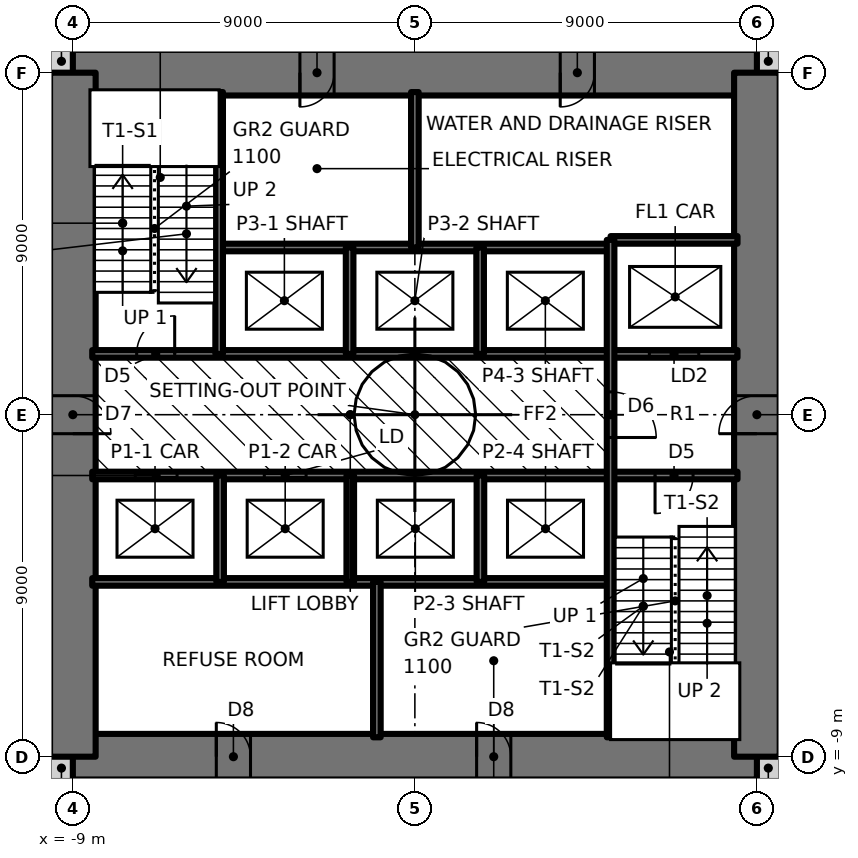
"""IFC4 building model, lengths in metres.
Left out: names, types, materials, properties, quantities, classifications, styles, units other than length and angle.
Written with IfcOpenShell. Run it as: python <this file> out.ifc"""

import sys

from ifc_helpers import new_model, si_unit, direction, frame, frame_2d, origin, place, context, subcontext, project, spatial, rectangle, extrude, element, fill, save


model = new_model("IFC4")
c1 = context("Model", 3, precision=1e-05, world=origin(), true_north=direction((0.0, 1.0)))
c2 = subcontext(c1, "Body", "Model", "MODEL_VIEW")
j1 = project(units=[si_unit("LENGTHUNIT", "METRE"), si_unit("PLANEANGLEUNIT", "RADIAN")], contexts=[c1])
p1 = place(None, origin())
s1 = spatial("IfcSite", under=j1, at=p1, CompositionType="ELEMENT")
p2 = place(p1, origin())
s2 = spatial("IfcBuilding", under=s1, at=p2, CompositionType="ELEMENT")
p3 = place(p2, frame((0.0, 0.0, 10.5)))
s3 = spatial("IfcBuildingStorey", under=s2, at=p3, CompositionType="ELEMENT", Elevation=10.5)
for number, where, z_axis, x_axis in (
    (1, (-9.6, -9.3, 0.0), (0.0, 0.0, 1.0), (1.0, 0.0, 0.0)),
    (2, (9.0, -9.3, 0.0), (0.0, 0.0, 1.0), (1.0, 0.0, 0.0)),
    (3, (9.0, 9.3, 0.0), (0.0, 0.0, 1.0), (1.0, 0.0, 0.0)),
    (4, (-9.6, 9.3, 0.0), (0.0, 0.0, 1.0), (1.0, 0.0, 0.0)),
):
    element("IfcWall", number, at=place(p3, frame(where, z_axis=z_axis, x_axis=x_axis)), inside=s3, PredefinedType="SOLIDWALL", context=c2, shape_type="SweptSolid", body=[
        extrude(rectangle(XDim=0.6, YDim=0.6, at=frame_2d((0.3, 0.0))), origin(), (0.0, 0.0, 1.0), 4.5),
    ])
p4 = place(p3, frame((-9.0, -9.0, 0.0), z_axis=(0.0, 0.0, 1.0), x_axis=(1.0, 0.0, 0.0)))
e5 = element("IfcWall", 5, at=p4, inside=s3, PredefinedType="SHEAR", context=c2, shape_type="SweptSolid", body=[
    extrude(rectangle(XDim=18.0, YDim=1.2, at=frame_2d((9.0, 0.0))), origin(), (0.0, 0.0, 1.0), 4.5),
])
p5 = place(p4, frame((3.775, 0.0, 0.0)))
e6 = element("IfcOpeningElement", 6, at=p5, cuts=e5, PredefinedType="OPENING", context=c2, shape_type="SweptSolid", body=[
    extrude(rectangle(XDim=0.9, YDim=2.1, at=frame_2d((0.45, 1.05))), frame((0.0, 0.61, 0.0), z_axis=(0.0, -1.0, 0.0), x_axis=(1.0, 0.0, 0.0)), (0.0, 0.0, 1.0), 1.22),
])
p6 = place(p4, frame((10.625, 0.0, 0.0)))
e7 = element("IfcOpeningElement", 7, at=p6, cuts=e5, PredefinedType="OPENING", context=c2, shape_type="SweptSolid", body=[
    extrude(rectangle(XDim=0.9, YDim=2.1, at=frame_2d((0.45, 1.05))), frame((0.0, 0.61, 0.0), z_axis=(0.0, -1.0, 0.0), x_axis=(1.0, 0.0, 0.0)), (0.0, 0.0, 1.0), 1.22),
])
p7 = place(p3, frame((9.0, 9.0, 0.0), z_axis=(0.0, 0.0, 1.0), x_axis=(-1.0, 0.0, 0.0)))
e8 = element("IfcWall", 8, at=p7, inside=s3, PredefinedType="SHEAR", context=c2, shape_type="SweptSolid", body=[
    extrude(rectangle(XDim=18.0, YDim=1.2, at=frame_2d((9.0, 0.0))), origin(), (0.0, 0.0, 1.0), 4.5),
])
p8 = place(p7, frame((11.125, 0.0, 0.0)))
e9 = element("IfcOpeningElement", 9, at=p8, cuts=e8, PredefinedType="OPENING", context=c2, shape_type="SweptSolid", body=[
    extrude(rectangle(XDim=0.9, YDim=2.1, at=frame_2d((0.45, 1.05))), frame((0.0, 0.61, 0.0), z_axis=(0.0, -1.0, 0.0), x_axis=(1.0, 0.0, 0.0)), (0.0, 0.0, 1.0), 1.22),
])
p9 = place(p7, frame((4.275, 0.0, 0.0)))
e10 = element("IfcOpeningElement", 10, at=p9, cuts=e8, PredefinedType="OPENING", context=c2, shape_type="SweptSolid", body=[
    extrude(rectangle(XDim=0.9, YDim=2.1, at=frame_2d((0.45, 1.05))), frame((0.0, 0.61, 0.0), z_axis=(0.0, -1.0, 0.0), x_axis=(1.0, 0.0, 0.0)), (0.0, 0.0, 1.0), 1.22),
])
p10 = place(p3, frame((9.0, -9.0, 0.0), z_axis=(0.0, 0.0, 1.0), x_axis=(0.0, 1.0, 0.0)))
e11 = element("IfcWall", 11, at=p10, inside=s3, PredefinedType="SHEAR", context=c2, shape_type="SweptSolid", body=[
    extrude(rectangle(XDim=18.0, YDim=1.2, at=frame_2d((9.0, 0.0))), origin(), (0.0, 0.0, 1.0), 4.5),
])
p11 = place(p10, frame((8.5, 0.0, 0.0)))
e12 = element("IfcOpeningElement", 12, at=p11, cuts=e11, PredefinedType="OPENING", context=c2, shape_type="SweptSolid", body=[
    extrude(rectangle(XDim=1.0, YDim=2.1, at=frame_2d((0.5, 1.05))), frame((0.0, 0.61, 0.0), z_axis=(0.0, -1.0, 0.0), x_axis=(1.0, 0.0, 0.0)), (0.0, 0.0, 1.0), 1.22),
])
p12 = place(p3, frame((-9.0, 9.0, 0.0), z_axis=(0.0, 0.0, 1.0), x_axis=(0.0, -1.0, 0.0)))
e13 = element("IfcWall", 13, at=p12, inside=s3, PredefinedType="SHEAR", context=c2, shape_type="SweptSolid", body=[
    extrude(rectangle(XDim=18.0, YDim=1.2, at=frame_2d((9.0, 0.0))), origin(), (0.0, 0.0, 1.0), 4.5),
])
p13 = place(p12, frame((8.5, 0.0, 0.0)))
e14 = element("IfcOpeningElement", 14, at=p13, cuts=e13, PredefinedType="OPENING", context=c2, shape_type="SweptSolid", body=[
    extrude(rectangle(XDim=1.0, YDim=2.1, at=frame_2d((0.5, 1.05))), frame((0.0, 0.61, 0.0), z_axis=(0.0, -1.0, 0.0), x_axis=(1.0, 0.0, 0.0)), (0.0, 0.0, 1.0), 1.22),
])
p14 = place(p3, frame((-8.49, -4.4, 0.0), z_axis=(0.0, 0.0, 1.0), x_axis=(1.0, 0.0, 0.0)))
e15 = element("IfcWall", 15, at=p14, inside=s3, PredefinedType="SOLIDWALL", context=c2, shape_type="SweptSolid", body=[
    extrude(rectangle(XDim=13.64, YDim=0.2, at=frame_2d((6.82, 0.0))), origin(), (0.0, 0.0, 1.0), 4.5),
])
p15 = place(p3, frame((-8.49, -1.6, 0.0), z_axis=(0.0, 0.0, 1.0), x_axis=(1.0, 0.0, 0.0)))
e16 = element("IfcWall", 16, at=p15, inside=s3, PredefinedType="SOLIDWALL", context=c2, shape_type="SweptSolid", body=[
    extrude(rectangle(XDim=16.98, YDim=0.2, at=frame_2d((8.49, 0.0))), origin(), (0.0, 0.0, 1.0), 4.5),
])
p16 = place(p15, frame((14.81, 0.0, 0.0)))
e17 = element("IfcOpeningElement", 17, at=p16, cuts=e16, PredefinedType="OPENING", context=c2, shape_type="SweptSolid", body=[
    extrude(rectangle(XDim=1.0, YDim=2.1, at=frame_2d((0.5, 1.05))), frame((0.0, 0.11, 0.0), z_axis=(0.0, -1.0, 0.0), x_axis=(1.0, 0.0, 0.0)), (0.0, 0.0, 1.0), 0.22),
])
p17 = place(p15, frame((1.133, 0.0, 0.0)))
e18 = element("IfcOpeningElement", 18, at=p17, cuts=e16, PredefinedType="OPENING", context=c2, shape_type="SweptSolid", body=[
    extrude(rectangle(XDim=1.1, YDim=2.1, at=frame_2d((0.55, 1.05))), frame((0.0, 0.11, 0.0), z_axis=(0.0, -1.0, 0.0), x_axis=(1.0, 0.0, 0.0)), (0.0, 0.0, 1.0), 0.22),
])
p18 = place(p15, frame((4.528, 0.0, 0.0)))
e19 = element("IfcOpeningElement", 19, at=p18, cuts=e16, PredefinedType="OPENING", context=c2, shape_type="SweptSolid", body=[
    extrude(rectangle(XDim=1.1, YDim=2.1, at=frame_2d((0.55, 1.05))), frame((0.0, 0.11, 0.0), z_axis=(0.0, -1.0, 0.0), x_axis=(1.0, 0.0, 0.0)), (0.0, 0.0, 1.0), 0.22),
])
p19 = place(p3, frame((-8.49, 1.6, 0.0), z_axis=(0.0, 0.0, 1.0), x_axis=(1.0, 0.0, 0.0)))
e20 = element("IfcWall", 20, at=p19, inside=s3, PredefinedType="SOLIDWALL", context=c2, shape_type="SweptSolid", body=[
    extrude(rectangle(XDim=16.98, YDim=0.2, at=frame_2d((8.49, 0.0))), origin(), (0.0, 0.0, 1.0), 4.5),
])
p20 = place(p19, frame((1.17, 0.0, 0.0)))
e21 = element("IfcOpeningElement", 21, at=p20, cuts=e20, PredefinedType="OPENING", context=c2, shape_type="SweptSolid", body=[
    extrude(rectangle(XDim=1.0, YDim=2.1, at=frame_2d((0.5, 1.05))), frame((0.0, 0.11, 0.0), z_axis=(0.0, -1.0, 0.0), x_axis=(1.0, 0.0, 0.0)), (0.0, 0.0, 1.0), 0.22),
])
p21 = place(p19, frame((14.66, 0.0, 0.0)))
e22 = element("IfcOpeningElement", 22, at=p21, cuts=e20, PredefinedType="OPENING", context=c2, shape_type="SweptSolid", body=[
    extrude(rectangle(XDim=1.3, YDim=2.1, at=frame_2d((0.65, 1.05))), frame((0.0, 0.11, 0.0), z_axis=(0.0, -1.0, 0.0), x_axis=(1.0, 0.0, 0.0)), (0.0, 0.0, 1.0), 0.22),
])
p22 = place(p3, frame((-5.15, 4.4, 0.0), z_axis=(0.0, 0.0, 1.0), x_axis=(1.0, 0.0, 0.0)))
e23 = element("IfcWall", 23, at=p22, inside=s3, PredefinedType="SOLIDWALL", context=c2, shape_type="SweptSolid", body=[
    extrude(rectangle(XDim=10.3, YDim=0.2, at=frame_2d((5.15, 0.0))), origin(), (0.0, 0.0, 1.0), 4.5),
])
p23 = place(p3, frame((5.15, 4.6, 0.0), z_axis=(0.0, 0.0, 1.0), x_axis=(1.0, 0.0, 0.0)))
e24 = element("IfcWall", 24, at=p23, inside=s3, PredefinedType="SOLIDWALL", context=c2, shape_type="SweptSolid", body=[
    extrude(rectangle(XDim=3.34, YDim=0.2, at=frame_2d((1.67, 0.0))), origin(), (0.0, 0.0, 1.0), 4.5),
])
p24 = place(p3, frame((5.15, -8.49, 0.0), z_axis=(0.0, 0.0, 1.0), x_axis=(0.0, 1.0, 0.0)))
e25 = element("IfcWall", 25, at=p24, inside=s3, PredefinedType="SOLIDWALL", context=c2, shape_type="SweptSolid", body=[
    extrude(rectangle(XDim=13.09, YDim=0.2, at=frame_2d((6.545, 0.0))), origin(), (0.0, 0.0, 1.0), 4.5),
])
p25 = place(p24, frame((7.89, 0.0, 0.0)))
e26 = element("IfcOpeningElement", 26, at=p25, cuts=e25, PredefinedType="OPENING", context=c2, shape_type="SweptSolid", body=[
    extrude(rectangle(XDim=1.2, YDim=2.1, at=frame_2d((0.6, 1.05))), frame((0.0, 0.11, 0.0), z_axis=(0.0, -1.0, 0.0), x_axis=(1.0, 0.0, 0.0)), (0.0, 0.0, 1.0), 0.22),
])
for number, where, z_axis, x_axis in (
    (27, (1.725, -4.4, 0.0), (0.0, 0.0, 1.0), (0.0, 1.0, 0.0)),
    (28, (1.717, 1.6, 0.0), (0.0, 0.0, 1.0), (0.0, 1.0, 0.0)),
):
    element("IfcWall", number, at=place(p3, frame(where, z_axis=z_axis, x_axis=x_axis)), inside=s3, PredefinedType="SOLIDWALL", context=c2, shape_type="SweptSolid", body=[
        extrude(rectangle(XDim=2.8, YDim=0.2, at=frame_2d((1.4, 0.0))), origin(), (0.0, 0.0, 1.0), 4.5),
    ])
for number, where, z_axis, x_axis in (
    (29, (0.0, 4.4, 0.0), (0.0, 0.0, 1.0), (0.0, 1.0, 0.0)),
    (30, (-1.0, -8.49, 0.0), (0.0, 0.0, 1.0), (0.0, 1.0, 0.0)),
):
    element("IfcWall", number, at=place(p3, frame(where, z_axis=z_axis, x_axis=x_axis)), inside=s3, PredefinedType="SOLIDWALL", context=c2, shape_type="SweptSolid", body=[
        extrude(rectangle(XDim=4.09, YDim=0.2, at=frame_2d((2.045, 0.0))), origin(), (0.0, 0.0, 1.0), 4.5),
    ])
for number, where, z_axis, x_axis in (
    (31, (-1.7, -4.4, 0.0), (0.0, 0.0, 1.0), (0.0, 1.0, 0.0)),
    (32, (-1.717, 1.6, 0.0), (0.0, 0.0, 1.0), (0.0, 1.0, 0.0)),
    (33, (-5.125, -4.4, 0.0), (0.0, 0.0, 1.0), (0.0, 1.0, 0.0)),
):
    element("IfcWall", number, at=place(p3, frame(where, z_axis=z_axis, x_axis=x_axis)), inside=s3, PredefinedType="SOLIDWALL", context=c2, shape_type="SweptSolid", body=[
        extrude(rectangle(XDim=2.8, YDim=0.2, at=frame_2d((1.4, 0.0))), origin(), (0.0, 0.0, 1.0), 4.5),
    ])
p26 = place(p3, frame((-5.15, 1.6, 0.0), z_axis=(0.0, 0.0, 1.0), x_axis=(0.0, 1.0, 0.0)))
e34 = element("IfcWall", 34, at=p26, inside=s3, PredefinedType="SOLIDWALL", context=c2, shape_type="SweptSolid", body=[
    extrude(rectangle(XDim=6.89, YDim=0.2, at=frame_2d((3.445, 0.0))), origin(), (0.0, 0.0, 1.0), 4.5),
])
p27 = place(p20, origin())
e35 = element("IfcDoor", 35, at=p27, inside=s3, OperationType="SINGLE_SWING_RIGHT", PredefinedType="DOOR", context=c2, shape_type="SweptSolid", body=[
    extrude(rectangle(XDim=1.0, YDim=2.1, at=frame_2d((0.5, 1.05))), frame((0.0, 0.025, 0.0), z_axis=(0.0, -1.0, 0.0), x_axis=(1.0, 0.0, 0.0)), (0.0, 0.0, 1.0), 0.05),
])
fill(e21, e35)
p28 = place(p16, frame((1.0, 0.0, 0.0), z_axis=(0.0, 0.0, 1.0), x_axis=(-1.0, 0.0, 0.0)))
e36 = element("IfcDoor", 36, at=p28, inside=s3, OperationType="SINGLE_SWING_RIGHT", PredefinedType="DOOR", context=c2, shape_type="SweptSolid", body=[
    extrude(rectangle(XDim=1.0, YDim=2.1, at=frame_2d((0.5, 1.05))), frame((0.0, 0.025, 0.0), z_axis=(0.0, -1.0, 0.0), x_axis=(1.0, 0.0, 0.0)), (0.0, 0.0, 1.0), 0.05),
])
fill(e17, e36)
p29 = place(p25, frame((1.2, 0.0, 0.0), z_axis=(0.0, 0.0, 1.0), x_axis=(-1.0, 0.0, 0.0)))
e37 = element("IfcDoor", 37, at=p29, inside=s3, OperationType="SINGLE_SWING_RIGHT", PredefinedType="DOOR", context=c2, shape_type="SweptSolid", body=[
    extrude(rectangle(XDim=1.2, YDim=2.1, at=frame_2d((0.6, 1.05))), frame((0.0, 0.025, 0.0), z_axis=(0.0, -1.0, 0.0), x_axis=(1.0, 0.0, 0.0)), (0.0, 0.0, 1.0), 0.05),
])
fill(e26, e37)
p30 = place(p13, origin())
e38 = element("IfcDoor", 38, at=p30, inside=s3, OperationType="SINGLE_SWING_RIGHT", PredefinedType="DOOR", context=c2, shape_type="SweptSolid", body=[
    extrude(rectangle(XDim=1.0, YDim=2.1, at=frame_2d((0.5, 1.05))), frame((0.0, 0.025, 0.0), z_axis=(0.0, -1.0, 0.0), x_axis=(1.0, 0.0, 0.0)), (0.0, 0.0, 1.0), 0.05),
])
fill(e14, e38)
p31 = place(p11, origin())
e39 = element("IfcDoor", 39, at=p31, inside=s3, OperationType="SINGLE_SWING_LEFT", PredefinedType="DOOR", context=c2, shape_type="SweptSolid", body=[
    extrude(rectangle(XDim=1.0, YDim=2.1, at=frame_2d((0.5, 1.05))), frame((0.0, 0.025, 0.0), z_axis=(0.0, -1.0, 0.0), x_axis=(1.0, 0.0, 0.0)), (0.0, 0.0, 1.0), 0.05),
])
fill(e12, e39)
p32 = place(p8, origin())
e40 = element("IfcDoor", 40, at=p32, inside=s3, OperationType="SINGLE_SWING_RIGHT", PredefinedType="DOOR", context=c2, shape_type="SweptSolid", body=[
    extrude(rectangle(XDim=0.9, YDim=2.1, at=frame_2d((0.45, 1.05))), frame((0.0, 0.025, 0.0), z_axis=(0.0, -1.0, 0.0), x_axis=(1.0, 0.0, 0.0)), (0.0, 0.0, 1.0), 0.05),
])
fill(e9, e40)
p33 = place(p9, origin())
e41 = element("IfcDoor", 41, at=p33, inside=s3, OperationType="SINGLE_SWING_RIGHT", PredefinedType="DOOR", context=c2, shape_type="SweptSolid", body=[
    extrude(rectangle(XDim=0.9, YDim=2.1, at=frame_2d((0.45, 1.05))), frame((0.0, 0.025, 0.0), z_axis=(0.0, -1.0, 0.0), x_axis=(1.0, 0.0, 0.0)), (0.0, 0.0, 1.0), 0.05),
])
fill(e10, e41)
p34 = place(p5, origin())
e42 = element("IfcDoor", 42, at=p34, inside=s3, OperationType="SINGLE_SWING_LEFT", PredefinedType="DOOR", context=c2, shape_type="SweptSolid", body=[
    extrude(rectangle(XDim=0.9, YDim=2.1, at=frame_2d((0.45, 1.05))), frame((0.0, 0.025, 0.0), z_axis=(0.0, -1.0, 0.0), x_axis=(1.0, 0.0, 0.0)), (0.0, 0.0, 1.0), 0.05),
])
fill(e6, e42)
p35 = place(p6, origin())
e43 = element("IfcDoor", 43, at=p35, inside=s3, OperationType="SINGLE_SWING_LEFT", PredefinedType="DOOR", context=c2, shape_type="SweptSolid", body=[
    extrude(rectangle(XDim=0.9, YDim=2.1, at=frame_2d((0.45, 1.05))), frame((0.0, 0.025, 0.0), z_axis=(0.0, -1.0, 0.0), x_axis=(1.0, 0.0, 0.0)), (0.0, 0.0, 1.0), 0.05),
])
fill(e7, e43)
p36 = place(p17, origin())
e44 = element("IfcDoor", 44, at=p36, inside=s3, OperationType="DOUBLE_DOOR_SLIDING", PredefinedType="DOOR", context=c2, shape_type="SweptSolid", body=[
    extrude(rectangle(XDim=1.1, YDim=2.1, at=frame_2d((0.55, 1.05))), frame((0.0, 0.025, 0.0), z_axis=(0.0, -1.0, 0.0), x_axis=(1.0, 0.0, 0.0)), (0.0, 0.0, 1.0), 0.05),
])
fill(e18, e44)
p37 = place(p18, origin())
e45 = element("IfcDoor", 45, at=p37, inside=s3, OperationType="DOUBLE_DOOR_SLIDING", PredefinedType="DOOR", context=c2, shape_type="SweptSolid", body=[
    extrude(rectangle(XDim=1.1, YDim=2.1, at=frame_2d((0.55, 1.05))), frame((0.0, 0.025, 0.0), z_axis=(0.0, -1.0, 0.0), x_axis=(1.0, 0.0, 0.0)), (0.0, 0.0, 1.0), 0.05),
])
fill(e19, e45)
p38 = place(p21, origin())
e46 = element("IfcDoor", 46, at=p38, inside=s3, OperationType="SLIDING_TO_LEFT", PredefinedType="DOOR", context=c2, shape_type="SweptSolid", body=[
    extrude(rectangle(XDim=1.3, YDim=2.1, at=frame_2d((0.65, 1.05))), frame((0.0, 0.025, 0.0), z_axis=(0.0, -1.0, 0.0), x_axis=(1.0, 0.0, 0.0)), (0.0, 0.0, 1.0), 0.05),
])
fill(e22, e46)
save(model, sys.argv[1])
